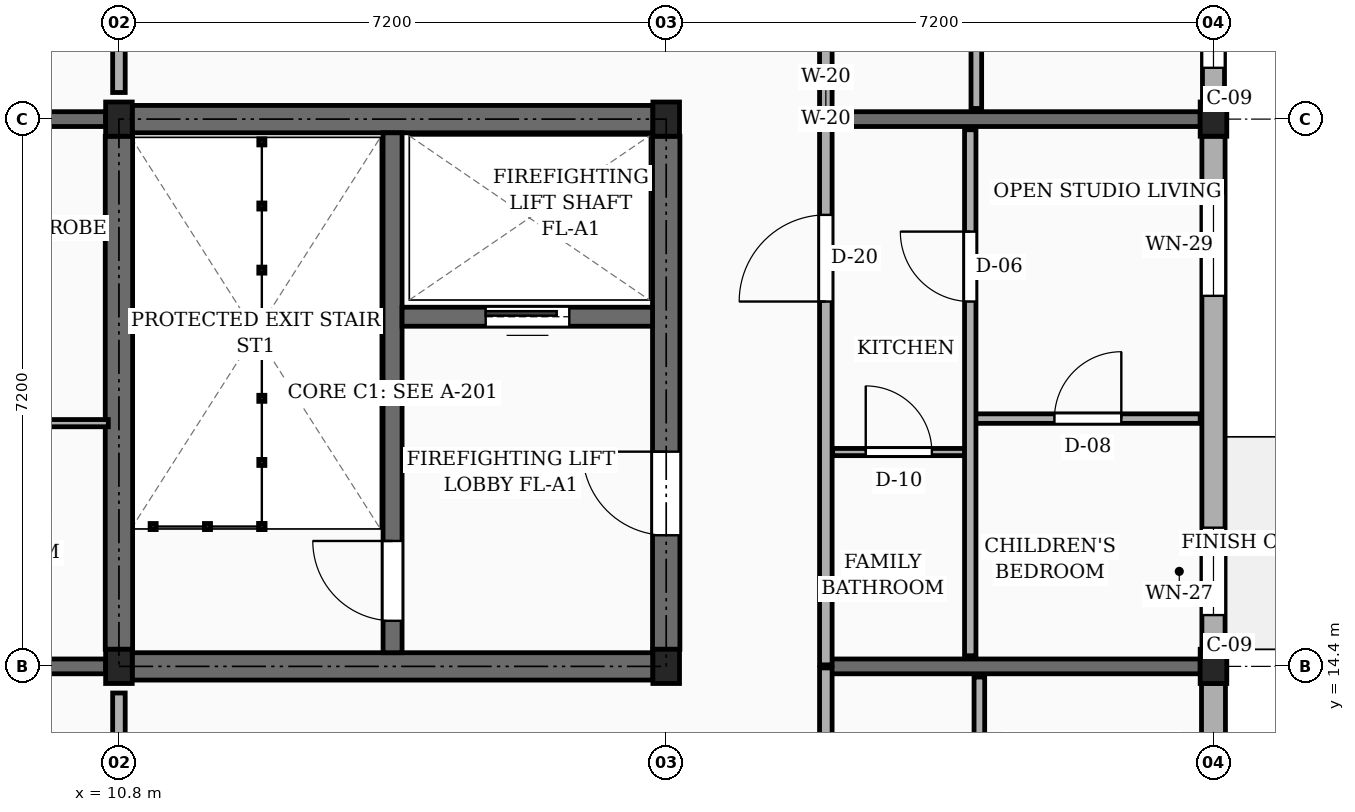
"""IFC4 building model, lengths in metres.
Left out: names, types, materials, properties, quantities, classifications, styles, units other than length and angle.
Written with IfcOpenShell. Run it as: python <this file> out.ifc"""

import sys

from ifc_helpers import new_model, si_unit, direction, frame, frame_2d, origin, origin_2d, place, context, subcontext, project, spatial, rectangle, extrude, element, fill, save


model = new_model("IFC4")
c1 = context("Model", 3, precision=1e-05, world=origin(), true_north=direction((0.0, 1.0)))
c2 = subcontext(c1, "Body", "Model", "MODEL_VIEW")
j1 = project(units=[si_unit("LENGTHUNIT", "METRE"), si_unit("PLANEANGLEUNIT", "RADIAN")], contexts=[c1])
p1 = place(None, origin())
s1 = spatial("IfcSite", under=j1, at=p1, CompositionType="ELEMENT")
p2 = place(p1, origin())
s2 = spatial("IfcBuilding", under=s1, at=p2, CompositionType="ELEMENT")
p3 = place(p2, frame((0.0, 0.0, 48.6)))
s3 = spatial("IfcBuildingStorey", under=s2, at=p3, CompositionType="ELEMENT", Elevation=48.6)
for number, where, z_axis, x_axis in (
    (1, (10.8, 14.4, 0.0), (0.0, 0.0, 1.0), (1.0, 0.0, 0.0)),
    (2, (10.8, 21.6, 0.0), (0.0, 0.0, 1.0), (1.0, 0.0, 0.0)),
    (3, (18.0, 14.4, 0.0), (0.0, 0.0, 1.0), (1.0, 0.0, 0.0)),
    (4, (18.0, 21.6, 0.0), (0.0, 0.0, 1.0), (1.0, 0.0, 0.0)),
    (5, (25.2, 14.4, 0.0), (0.0, 0.0, 1.0), (1.0, 0.0, 0.0)),
    (6, (25.2, 21.6, 0.0), (0.0, 0.0, 1.0), (1.0, 0.0, 0.0)),
):
    element("IfcColumn", number, at=place(p3, frame(where, z_axis=z_axis, x_axis=x_axis)), inside=s3, PredefinedType="COLUMN", context=c2, shape_type="SweptSolid", body=[
        extrude(rectangle(XDim=0.35, YDim=0.45, at=origin_2d()), origin(), (0.0, 0.0, 1.0), 3.15),
    ])
p4 = place(p3, frame((3.775, 14.4, 0.0), z_axis=(0.0, 0.0, 1.0), x_axis=(1.0, 0.0, 0.0)))
e7 = element("IfcWall", 7, at=p4, inside=s3, PredefinedType="SOLIDWALL", context=c2, shape_type="SweptSolid", body=[
    extrude(rectangle(XDim=6.85, YDim=0.195, at=frame_2d((3.425, 0.0))), origin(), (0.0, 0.0, 1.0), 2.22),
])
p5 = place(p4, frame((1.35, 0.0, 0.0)))
e8 = element("IfcOpeningElement", 8, at=p5, cuts=e7, PredefinedType="OPENING", context=c2, shape_type="SweptSolid", body=[
    extrude(rectangle(XDim=0.98, YDim=2.12, at=frame_2d((0.49, 1.06))), frame((0.0, 0.107, 0.0), z_axis=(0.0, -1.0, 0.0), x_axis=(1.0, 0.0, 0.0)), (0.0, 0.0, 1.0), 0.215),
])
p6 = place(p3, frame((20.1, 14.4, 0.0), z_axis=(0.0, 0.0, 1.0), x_axis=(1.0, 0.0, 0.0)))
e9 = element("IfcWall", 9, at=p6, inside=s3, PredefinedType="SOLIDWALL", context=c2, shape_type="SweptSolid", body=[
    extrude(rectangle(XDim=4.925, YDim=0.195, at=frame_2d((2.462, 0.0))), origin(), (0.0, 0.0, 1.0), 2.22),
])
p7 = place(p3, frame((3.775, 21.6, 0.0), z_axis=(0.0, 0.0, 1.0), x_axis=(1.0, 0.0, 0.0)))
e10 = element("IfcWall", 10, at=p7, inside=s3, PredefinedType="SOLIDWALL", context=c2, shape_type="SweptSolid", body=[
    extrude(rectangle(XDim=6.85, YDim=0.195, at=frame_2d((3.425, 0.0))), origin(), (0.0, 0.0, 1.0), 2.22),
])
p8 = place(p3, frame((20.1, 21.6, 0.0), z_axis=(0.0, 0.0, 1.0), x_axis=(1.0, 0.0, 0.0)))
e11 = element("IfcWall", 11, at=p8, inside=s3, PredefinedType="SOLIDWALL", context=c2, shape_type="SweptSolid", body=[
    extrude(rectangle(XDim=4.925, YDim=0.195, at=frame_2d((2.462, 0.0))), origin(), (0.0, 0.0, 1.0), 2.22),
])
p9 = place(p3, frame((25.2, 7.425, 0.0), z_axis=(0.0, 0.0, 1.0), x_axis=(0.0, 1.0, 0.0)))
e12 = element("IfcWall", 12, at=p9, inside=s3, PredefinedType="SOLIDWALL", context=c2, shape_type="SweptSolid", body=[
    extrude(rectangle(XDim=6.75, YDim=0.315, at=frame_2d((3.375, 0.0))), origin(), (0.0, 0.0, 1.0), 2.46),
])
p10 = place(p9, frame((0.45, 0.0, 0.78)))
e13 = element("IfcOpeningElement", 13, at=p10, cuts=e12, PredefinedType="OPENING", context=c2, shape_type="SweptSolid", body=[
    extrude(rectangle(XDim=0.94, YDim=1.44, at=frame_2d((0.47, 0.72))), frame((0.0, 0.167, 0.0), z_axis=(0.0, -1.0, 0.0), x_axis=(1.0, 0.0, 0.0)), (0.0, 0.0, 1.0), 0.335),
])
p11 = place(p9, frame((4.65, 0.0, 0.78)))
e14 = element("IfcOpeningElement", 14, at=p11, cuts=e12, PredefinedType="OPENING", context=c2, shape_type="SweptSolid", body=[
    extrude(rectangle(XDim=1.15, YDim=1.44, at=frame_2d((0.575, 0.72))), frame((0.0, 0.167, 0.0), z_axis=(0.0, -1.0, 0.0), x_axis=(1.0, 0.0, 0.0)), (0.0, 0.0, 1.0), 0.335),
])
p12 = place(p3, frame((25.2, 14.625, 0.0), z_axis=(0.0, 0.0, 1.0), x_axis=(0.0, 1.0, 0.0)))
e15 = element("IfcWall", 15, at=p12, inside=s3, PredefinedType="SOLIDWALL", context=c2, shape_type="SweptSolid", body=[
    extrude(rectangle(XDim=6.75, YDim=0.305, at=frame_2d((3.375, 0.0))), origin(), (0.0, 0.0, 1.0), 2.46),
])
p13 = place(p12, frame((0.45, 0.0, 0.78)))
e16 = element("IfcOpeningElement", 16, at=p13, cuts=e15, PredefinedType="OPENING", context=c2, shape_type="SweptSolid", body=[
    extrude(rectangle(XDim=1.15, YDim=1.44, at=frame_2d((0.575, 0.72))), frame((0.0, 0.163, 0.0), z_axis=(0.0, -1.0, 0.0), x_axis=(1.0, 0.0, 0.0)), (0.0, 0.0, 1.0), 0.325),
])
p14 = place(p12, frame((4.65, 0.0, 0.78)))
e17 = element("IfcOpeningElement", 17, at=p14, cuts=e15, PredefinedType="OPENING", context=c2, shape_type="SweptSolid", body=[
    extrude(rectangle(XDim=1.35, YDim=1.44, at=frame_2d((0.675, 0.72))), frame((0.0, 0.163, 0.0), z_axis=(0.0, -1.0, 0.0), x_axis=(1.0, 0.0, 0.0)), (0.0, 0.0, 1.0), 0.325),
])
p15 = place(p3, frame((25.2, 21.825, 0.0), z_axis=(0.0, 0.0, 1.0), x_axis=(0.0, 1.0, 0.0)))
e18 = element("IfcWall", 18, at=p15, inside=s3, PredefinedType="SOLIDWALL", context=c2, shape_type="SweptSolid", body=[
    extrude(rectangle(XDim=6.75, YDim=0.29, at=frame_2d((3.375, 0.0))), origin(), (0.0, 0.0, 1.0), 2.46),
])
p16 = place(p15, frame((0.45, 0.0, 0.78)))
e19 = element("IfcOpeningElement", 19, at=p16, cuts=e18, PredefinedType="OPENING", context=c2, shape_type="SweptSolid", body=[
    extrude(rectangle(XDim=1.35, YDim=1.44, at=frame_2d((0.675, 0.72))), frame((0.0, 0.155, 0.0), z_axis=(0.0, -1.0, 0.0), x_axis=(1.0, 0.0, 0.0)), (0.0, 0.0, 1.0), 0.31),
])
p17 = place(p15, frame((4.65, 0.0, 0.78)))
e20 = element("IfcOpeningElement", 20, at=p17, cuts=e18, PredefinedType="OPENING", context=c2, shape_type="SweptSolid", body=[
    extrude(rectangle(XDim=0.85, YDim=1.15, at=frame_2d((0.425, 0.575))), frame((0.0, 0.155, 0.0), z_axis=(0.0, -1.0, 0.0), x_axis=(1.0, 0.0, 0.0)), (0.0, 0.0, 1.0), 0.31),
])
p18 = place(p3, frame((10.8, 14.625, 0.0), z_axis=(0.0, 0.0, 1.0), x_axis=(0.0, 1.0, 0.0)))
e21 = element("IfcWall", 21, at=p18, inside=s3, PredefinedType="SHEAR", context=c2, shape_type="SweptSolid", body=[
    extrude(rectangle(XDim=6.75, YDim=0.36, at=frame_2d((3.375, 0.0))), origin(), (0.0, 0.0, 1.0), 2.89),
])
p19 = place(p3, frame((10.975, 21.6, 0.0), z_axis=(0.0, 0.0, 1.0), x_axis=(1.0, 0.0, 0.0)))
e22 = element("IfcWall", 22, at=p19, inside=s3, PredefinedType="SHEAR", context=c2, shape_type="SweptSolid", body=[
    extrude(rectangle(XDim=6.85, YDim=0.36, at=frame_2d((3.425, 0.0))), origin(), (0.0, 0.0, 1.0), 2.89),
])
p20 = place(p3, frame((18.0, 14.625, 0.0), z_axis=(0.0, 0.0, 1.0), x_axis=(0.0, 1.0, 0.0)))
e23 = element("IfcWall", 23, at=p20, inside=s3, PredefinedType="SHEAR", context=c2, shape_type="SweptSolid", body=[
    extrude(rectangle(XDim=6.75, YDim=0.36, at=frame_2d((3.375, 0.0))), origin(), (0.0, 0.0, 1.0), 2.89),
])
p21 = place(p20, frame((1.5, 0.0, 0.0)))
e24 = element("IfcOpeningElement", 24, at=p21, cuts=e23, PredefinedType="OPENING", context=c2, shape_type="SweptSolid", body=[
    extrude(rectangle(XDim=1.1, YDim=2.15, at=frame_2d((0.55, 1.075))), frame((0.0, 0.19, 0.0), z_axis=(0.0, -1.0, 0.0), x_axis=(1.0, 0.0, 0.0)), (0.0, 0.0, 1.0), 0.38),
])
p22 = place(p3, frame((10.975, 14.4, 0.0), z_axis=(0.0, 0.0, 1.0), x_axis=(1.0, 0.0, 0.0)))
e25 = element("IfcWall", 25, at=p22, inside=s3, PredefinedType="SHEAR", context=c2, shape_type="SweptSolid", body=[
    extrude(rectangle(XDim=6.85, YDim=0.36, at=frame_2d((3.425, 0.0))), origin(), (0.0, 0.0, 1.0), 2.89),
])
p23 = place(p3, frame((14.4, 14.58, 0.0), z_axis=(0.0, 0.0, 1.0), x_axis=(0.0, 1.0, 0.0)))
e26 = element("IfcWall", 26, at=p23, inside=s3, PredefinedType="SHEAR", context=c2, shape_type="SweptSolid", body=[
    extrude(rectangle(XDim=6.84, YDim=0.25, at=frame_2d((3.42, 0.0))), origin(), (0.0, 0.0, 1.0), 2.89),
])
p24 = place(p23, frame((0.42, 0.0, 0.0)))
e27 = element("IfcOpeningElement", 27, at=p24, cuts=e26, PredefinedType="OPENING", context=c2, shape_type="SweptSolid", body=[
    extrude(rectangle(XDim=1.05, YDim=2.15, at=frame_2d((0.525, 1.075))), frame((0.0, 0.135, 0.0), z_axis=(0.0, -1.0, 0.0), x_axis=(1.0, 0.0, 0.0)), (0.0, 0.0, 1.0), 0.27),
])
p25 = place(p3, frame((14.525, 19.0, 0.0), z_axis=(0.0, 0.0, 1.0), x_axis=(1.0, 0.0, 0.0)))
e28 = element("IfcWall", 28, at=p25, inside=s3, PredefinedType="SHEAR", context=c2, shape_type="SweptSolid", body=[
    extrude(rectangle(XDim=3.295, YDim=0.25, at=frame_2d((1.647, 0.0))), origin(), (0.0, 0.0, 1.0), 2.89),
])
p26 = place(p25, frame((1.1, 0.0, 0.0)))
e29 = element("IfcOpeningElement", 29, at=p26, cuts=e28, PredefinedType="OPENING", context=c2, shape_type="SweptSolid", body=[
    extrude(rectangle(XDim=1.1, YDim=2.2, at=frame_2d((0.55, 1.1))), frame((0.0, 0.135, 0.0), z_axis=(0.0, -1.0, 0.0), x_axis=(1.0, 0.0, 0.0)), (0.0, 0.0, 1.0), 0.27),
])
p27 = place(p3, frame((20.1, 7.375, 0.0), z_axis=(0.0, 0.0, 1.0), x_axis=(0.0, 1.0, 0.0)))
e30 = element("IfcWall", 30, at=p27, inside=s3, PredefinedType="PARTITIONING", context=c2, shape_type="SweptSolid", body=[
    extrude(rectangle(XDim=7.005, YDim=0.165, at=frame_2d((3.502, 0.0))), origin(), (0.0, 0.0, 1.0), 2.325),
])
p28 = place(p27, frame((1.175, 0.0, 0.0)))
e31 = element("IfcOpeningElement", 31, at=p28, cuts=e30, PredefinedType="OPENING", context=c2, shape_type="SweptSolid", body=[
    extrude(rectangle(XDim=0.94, YDim=2.12, at=frame_2d((0.47, 1.06))), frame((0.0, 0.093, 0.0), z_axis=(0.0, -1.0, 0.0), x_axis=(1.0, 0.0, 0.0)), (0.0, 0.0, 1.0), 0.185),
])
p29 = place(p3, frame((20.1, 14.42, 0.0), z_axis=(0.0, 0.0, 1.0), x_axis=(0.0, 1.0, 0.0)))
e32 = element("IfcWall", 32, at=p29, inside=s3, PredefinedType="PARTITIONING", context=c2, shape_type="SweptSolid", body=[
    extrude(rectangle(XDim=7.16, YDim=0.165, at=frame_2d((3.58, 0.0))), origin(), (0.0, 0.0, 1.0), 2.325),
])
p30 = place(p29, frame((4.78, 0.0, 0.0)))
e33 = element("IfcOpeningElement", 33, at=p30, cuts=e32, PredefinedType="OPENING", context=c2, shape_type="SweptSolid", body=[
    extrude(rectangle(XDim=1.14, YDim=2.18, at=frame_2d((0.57, 1.09))), frame((0.0, 0.093, 0.0), z_axis=(0.0, -1.0, 0.0), x_axis=(1.0, 0.0, 0.0)), (0.0, 0.0, 1.0), 0.185),
])
p31 = place(p3, frame((20.1, 21.62, 0.0), z_axis=(0.0, 0.0, 1.0), x_axis=(0.0, 1.0, 0.0)))
e34 = element("IfcWall", 34, at=p31, inside=s3, PredefinedType="PARTITIONING", context=c2, shape_type="SweptSolid", body=[
    extrude(rectangle(XDim=7.16, YDim=0.165, at=frame_2d((3.58, 0.0))), origin(), (0.0, 0.0, 1.0), 2.325),
])
p32 = place(p31, frame((1.33, 0.0, 0.0)))
e35 = element("IfcOpeningElement", 35, at=p32, cuts=e34, PredefinedType="OPENING", context=c2, shape_type="SweptSolid", body=[
    extrude(rectangle(XDim=1.0, YDim=2.15, at=frame_2d((0.5, 1.075))), frame((0.0, 0.093, 0.0), z_axis=(0.0, -1.0, 0.0), x_axis=(1.0, 0.0, 0.0)), (0.0, 0.0, 1.0), 0.185),
])
p33 = place(p3, frame((10.8, 7.55, 0.0), z_axis=(0.0, 0.0, 1.0), x_axis=(0.0, 1.0, 0.0)))
e36 = element("IfcWall", 36, at=p33, inside=s3, PredefinedType="PARTITIONING", context=c2, shape_type="SweptSolid", body=[
    extrude(rectangle(XDim=6.5, YDim=0.165, at=frame_2d((3.25, 0.0))), origin(), (0.0, 0.0, 1.0), 2.325),
])
p34 = place(p33, frame((1.0, 0.0, 0.0)))
e37 = element("IfcOpeningElement", 37, at=p34, cuts=e36, PredefinedType="OPENING", context=c2, shape_type="SweptSolid", body=[
    extrude(rectangle(XDim=1.14, YDim=2.18, at=frame_2d((0.57, 1.09))), frame((0.0, 0.093, 0.0), z_axis=(0.0, -1.0, 0.0), x_axis=(1.0, 0.0, 0.0)), (0.0, 0.0, 1.0), 0.185),
])
p35 = place(p3, frame((10.8, 21.95, 0.0), z_axis=(0.0, 0.0, 1.0), x_axis=(0.0, 1.0, 0.0)))
e38 = element("IfcWall", 38, at=p35, inside=s3, PredefinedType="PARTITIONING", context=c2, shape_type="SweptSolid", body=[
    extrude(rectangle(XDim=6.5, YDim=0.165, at=frame_2d((3.25, 0.0))), origin(), (0.0, 0.0, 1.0), 2.325),
])
p36 = place(p35, frame((1.0, 0.0, 0.0)))
e39 = element("IfcOpeningElement", 39, at=p36, cuts=e38, PredefinedType="OPENING", context=c2, shape_type="SweptSolid", body=[
    extrude(rectangle(XDim=1.0, YDim=2.15, at=frame_2d((0.5, 1.075))), frame((0.0, 0.093, 0.0), z_axis=(0.0, -1.0, 0.0), x_axis=(1.0, 0.0, 0.0)), (0.0, 0.0, 1.0), 0.185),
])
p37 = place(p3, frame((22.12, 7.375, 0.0), z_axis=(0.0, 0.0, 1.0), x_axis=(0.0, 1.0, 0.0)))
e40 = element("IfcWall", 40, at=p37, inside=s3, PredefinedType="PARTITIONING", context=c2, shape_type="SweptSolid", body=[
    extrude(rectangle(XDim=6.885, YDim=0.14, at=frame_2d((3.442, 0.0))), origin(), (0.0, 0.0, 1.0), 2.325),
])
p38 = place(p37, frame((1.275, 0.0, 0.0)))
e41 = element("IfcOpeningElement", 41, at=p38, cuts=e40, PredefinedType="OPENING", context=c2, shape_type="SweptSolid", body=[
    extrude(rectangle(XDim=0.95, YDim=2.1, at=frame_2d((0.475, 1.05))), frame((0.0, 0.08, 0.0), z_axis=(0.0, -1.0, 0.0), x_axis=(1.0, 0.0, 0.0)), (0.0, 0.0, 1.0), 0.16),
])
p39 = place(p3, frame((7.27, 17.6, 0.0), z_axis=(0.0, 0.0, 1.0), x_axis=(1.0, 0.0, 0.0)))
e42 = element("IfcWall", 42, at=p39, inside=s3, PredefinedType="PARTITIONING", context=c2, shape_type="SweptSolid", body=[
    extrude(rectangle(XDim=3.39, YDim=0.095, at=frame_2d((1.695, 0.0))), origin(), (0.0, 0.0, 1.0), 2.325),
])
p40 = place(p3, frame((22.07, 17.66, 0.0), z_axis=(0.0, 0.0, 1.0), x_axis=(1.0, 0.0, 0.0)))
e43 = element("IfcWall", 43, at=p40, inside=s3, PredefinedType="PARTITIONING", context=c2, shape_type="SweptSolid", body=[
    extrude(rectangle(XDim=2.955, YDim=0.125, at=frame_2d((1.478, 0.0))), origin(), (0.0, 0.0, 1.0), 2.325),
])
p41 = place(p40, frame((1.038, 0.0, 0.0)))
e44 = element("IfcOpeningElement", 44, at=p41, cuts=e43, PredefinedType="OPENING", context=c2, shape_type="SweptSolid", body=[
    extrude(rectangle(XDim=0.88, YDim=2.08, at=frame_2d((0.44, 1.04))), frame((0.0, 0.073, 0.0), z_axis=(0.0, -1.0, 0.0), x_axis=(1.0, 0.0, 0.0)), (0.0, 0.0, 1.0), 0.145),
])
p42 = place(p3, frame((20.19, 17.22, 0.0), z_axis=(0.0, 0.0, 1.0), x_axis=(1.0, 0.0, 0.0)))
e45 = element("IfcWall", 45, at=p42, inside=s3, PredefinedType="PARTITIONING", context=c2, shape_type="SweptSolid", body=[
    extrude(rectangle(XDim=1.74, YDim=0.095, at=frame_2d((0.87, 0.0))), origin(), (0.0, 0.0, 1.0), 2.325),
])
p43 = place(p42, frame((0.435, 0.0, 0.0)))
e46 = element("IfcOpeningElement", 46, at=p43, cuts=e45, PredefinedType="OPENING", context=c2, shape_type="SweptSolid", body=[
    extrude(rectangle(XDim=0.87, YDim=2.05, at=frame_2d((0.435, 1.025))), frame((0.0, 0.058, 0.0), z_axis=(0.0, -1.0, 0.0), x_axis=(1.0, 0.0, 0.0)), (0.0, 0.0, 1.0), 0.115),
])
p44 = place(p3, frame((22.0, 14.54, 0.0), z_axis=(0.0, 0.0, 1.0), x_axis=(0.0, 1.0, 0.0)))
e47 = element("IfcWall", 47, at=p44, inside=s3, PredefinedType="PARTITIONING", context=c2, shape_type="SweptSolid", body=[
    extrude(rectangle(XDim=6.92, YDim=0.15, at=frame_2d((3.46, 0.0))), origin(), (0.0, 0.0, 1.0), 2.325),
])
p45 = place(p44, frame((4.66, 0.0, 0.0)))
e48 = element("IfcOpeningElement", 48, at=p45, cuts=e47, PredefinedType="OPENING", context=c2, shape_type="SweptSolid", body=[
    extrude(rectangle(XDim=0.92, YDim=2.1, at=frame_2d((0.46, 1.05))), frame((0.0, 0.085, 0.0), z_axis=(0.0, -1.0, 0.0), x_axis=(1.0, 0.0, 0.0)), (0.0, 0.0, 1.0), 0.17),
])
p46 = place(p3, frame((22.08, 21.74, 0.0), z_axis=(0.0, 0.0, 1.0), x_axis=(0.0, 1.0, 0.0)))
e49 = element("IfcWall", 49, at=p46, inside=s3, PredefinedType="PARTITIONING", context=c2, shape_type="SweptSolid", body=[
    extrude(rectangle(XDim=6.92, YDim=0.14, at=frame_2d((3.46, 0.0))), origin(), (0.0, 0.0, 1.0), 2.325),
])
p47 = place(p46, frame((1.31, 0.0, 0.0)))
e50 = element("IfcOpeningElement", 50, at=p47, cuts=e49, PredefinedType="OPENING", context=c2, shape_type="SweptSolid", body=[
    extrude(rectangle(XDim=0.95, YDim=2.1, at=frame_2d((0.475, 1.05))), frame((0.0, 0.08, 0.0), z_axis=(0.0, -1.0, 0.0), x_axis=(1.0, 0.0, 0.0)), (0.0, 0.0, 1.0), 0.16),
])
p48 = place(p13, origin())
e51 = element("IfcWindow", 51, at=p48, inside=s3, PartitioningType="SINGLE_PANEL", PredefinedType="WINDOW", context=c2, shape_type="SweptSolid", body=[
    extrude(rectangle(XDim=1.15, YDim=1.44, at=frame_2d((0.575, 0.72))), frame((0.0, 0.03, 0.0), z_axis=(0.0, -1.0, 0.0), x_axis=(1.0, 0.0, 0.0)), (0.0, 0.0, 1.0), 0.06),
])
fill(e16, e51)
p49 = place(p14, origin())
e52 = element("IfcWindow", 52, at=p49, inside=s3, PartitioningType="SINGLE_PANEL", PredefinedType="WINDOW", context=c2, shape_type="SweptSolid", body=[
    extrude(rectangle(XDim=1.35, YDim=1.44, at=frame_2d((0.675, 0.72))), frame((0.0, 0.03, 0.0), z_axis=(0.0, -1.0, 0.0), x_axis=(1.0, 0.0, 0.0)), (0.0, 0.0, 1.0), 0.06),
])
fill(e17, e52)
p50 = place(p16, origin())
e53 = element("IfcWindow", 53, at=p50, inside=s3, PartitioningType="SINGLE_PANEL", PredefinedType="WINDOW", context=c2, shape_type="SweptSolid", body=[
    extrude(rectangle(XDim=1.35, YDim=1.44, at=frame_2d((0.675, 0.72))), frame((0.0, 0.03, 0.0), z_axis=(0.0, -1.0, 0.0), x_axis=(1.0, 0.0, 0.0)), (0.0, 0.0, 1.0), 0.06),
])
fill(e19, e53)
p51 = place(p21, frame((1.1, 0.0, 0.0), z_axis=(0.0, 0.0, 1.0), x_axis=(-1.0, 0.0, 0.0)))
e54 = element("IfcDoor", 54, at=p51, inside=s3, OperationType="SINGLE_SWING_RIGHT", PredefinedType="DOOR", context=c2, shape_type="SweptSolid", body=[
    extrude(rectangle(XDim=1.1, YDim=2.15, at=frame_2d((0.55, 1.075))), frame((0.0, 0.025, 0.0), z_axis=(0.0, -1.0, 0.0), x_axis=(1.0, 0.0, 0.0)), (0.0, 0.0, 1.0), 0.05),
])
fill(e24, e54)
p52 = place(p24, origin())
e55 = element("IfcDoor", 55, at=p52, inside=s3, OperationType="SINGLE_SWING_RIGHT", PredefinedType="DOOR", context=c2, shape_type="SweptSolid", body=[
    extrude(rectangle(XDim=1.05, YDim=2.15, at=frame_2d((0.525, 1.075))), frame((0.0, 0.025, 0.0), z_axis=(0.0, -1.0, 0.0), x_axis=(1.0, 0.0, 0.0)), (0.0, 0.0, 1.0), 0.05),
])
fill(e27, e55)
p53 = place(p26, origin())
e56 = element("IfcDoor", 56, at=p53, inside=s3, OperationType="SLIDING_TO_LEFT", PredefinedType="DOOR", context=c2, shape_type="SweptSolid", body=[
    extrude(rectangle(XDim=1.1, YDim=2.2, at=frame_2d((0.55, 1.1))), frame((0.0, 0.025, 0.0), z_axis=(0.0, -1.0, 0.0), x_axis=(1.0, 0.0, 0.0)), (0.0, 0.0, 1.0), 0.05),
])
fill(e29, e56)
p54 = place(p30, origin())
e57 = element("IfcDoor", 57, at=p54, inside=s3, OperationType="SINGLE_SWING_LEFT", PredefinedType="DOOR", context=c2, shape_type="SweptSolid", body=[
    extrude(rectangle(XDim=1.14, YDim=2.18, at=frame_2d((0.57, 1.09))), frame((0.0, 0.025, 0.0), z_axis=(0.0, -1.0, 0.0), x_axis=(1.0, 0.0, 0.0)), (0.0, 0.0, 1.0), 0.05),
])
fill(e33, e57)
p55 = place(p41, origin())
e58 = element("IfcDoor", 58, at=p55, inside=s3, OperationType="SINGLE_SWING_RIGHT", PredefinedType="DOOR", context=c2, shape_type="SweptSolid", body=[
    extrude(rectangle(XDim=0.88, YDim=2.08, at=frame_2d((0.44, 1.04))), frame((0.0, 0.025, 0.0), z_axis=(0.0, -1.0, 0.0), x_axis=(1.0, 0.0, 0.0)), (0.0, 0.0, 1.0), 0.05),
])
fill(e44, e58)
p56 = place(p43, origin())
e59 = element("IfcDoor", 59, at=p56, inside=s3, OperationType="SINGLE_SWING_LEFT", PredefinedType="DOOR", context=c2, shape_type="SweptSolid", body=[
    extrude(rectangle(XDim=0.87, YDim=2.05, at=frame_2d((0.435, 1.025))), frame((0.0, 0.025, 0.0), z_axis=(0.0, -1.0, 0.0), x_axis=(1.0, 0.0, 0.0)), (0.0, 0.0, 1.0), 0.05),
])
fill(e46, e59)
p57 = place(p45, origin())
e60 = element("IfcDoor", 60, at=p57, inside=s3, OperationType="SINGLE_SWING_RIGHT", PredefinedType="DOOR", context=c2, shape_type="SweptSolid", body=[
    extrude(rectangle(XDim=0.92, YDim=2.1, at=frame_2d((0.46, 1.05))), frame((0.0, 0.025, 0.0), z_axis=(0.0, -1.0, 0.0), x_axis=(1.0, 0.0, 0.0)), (0.0, 0.0, 1.0), 0.05),
])
fill(e48, e60)
save(model, sys.argv[1])
